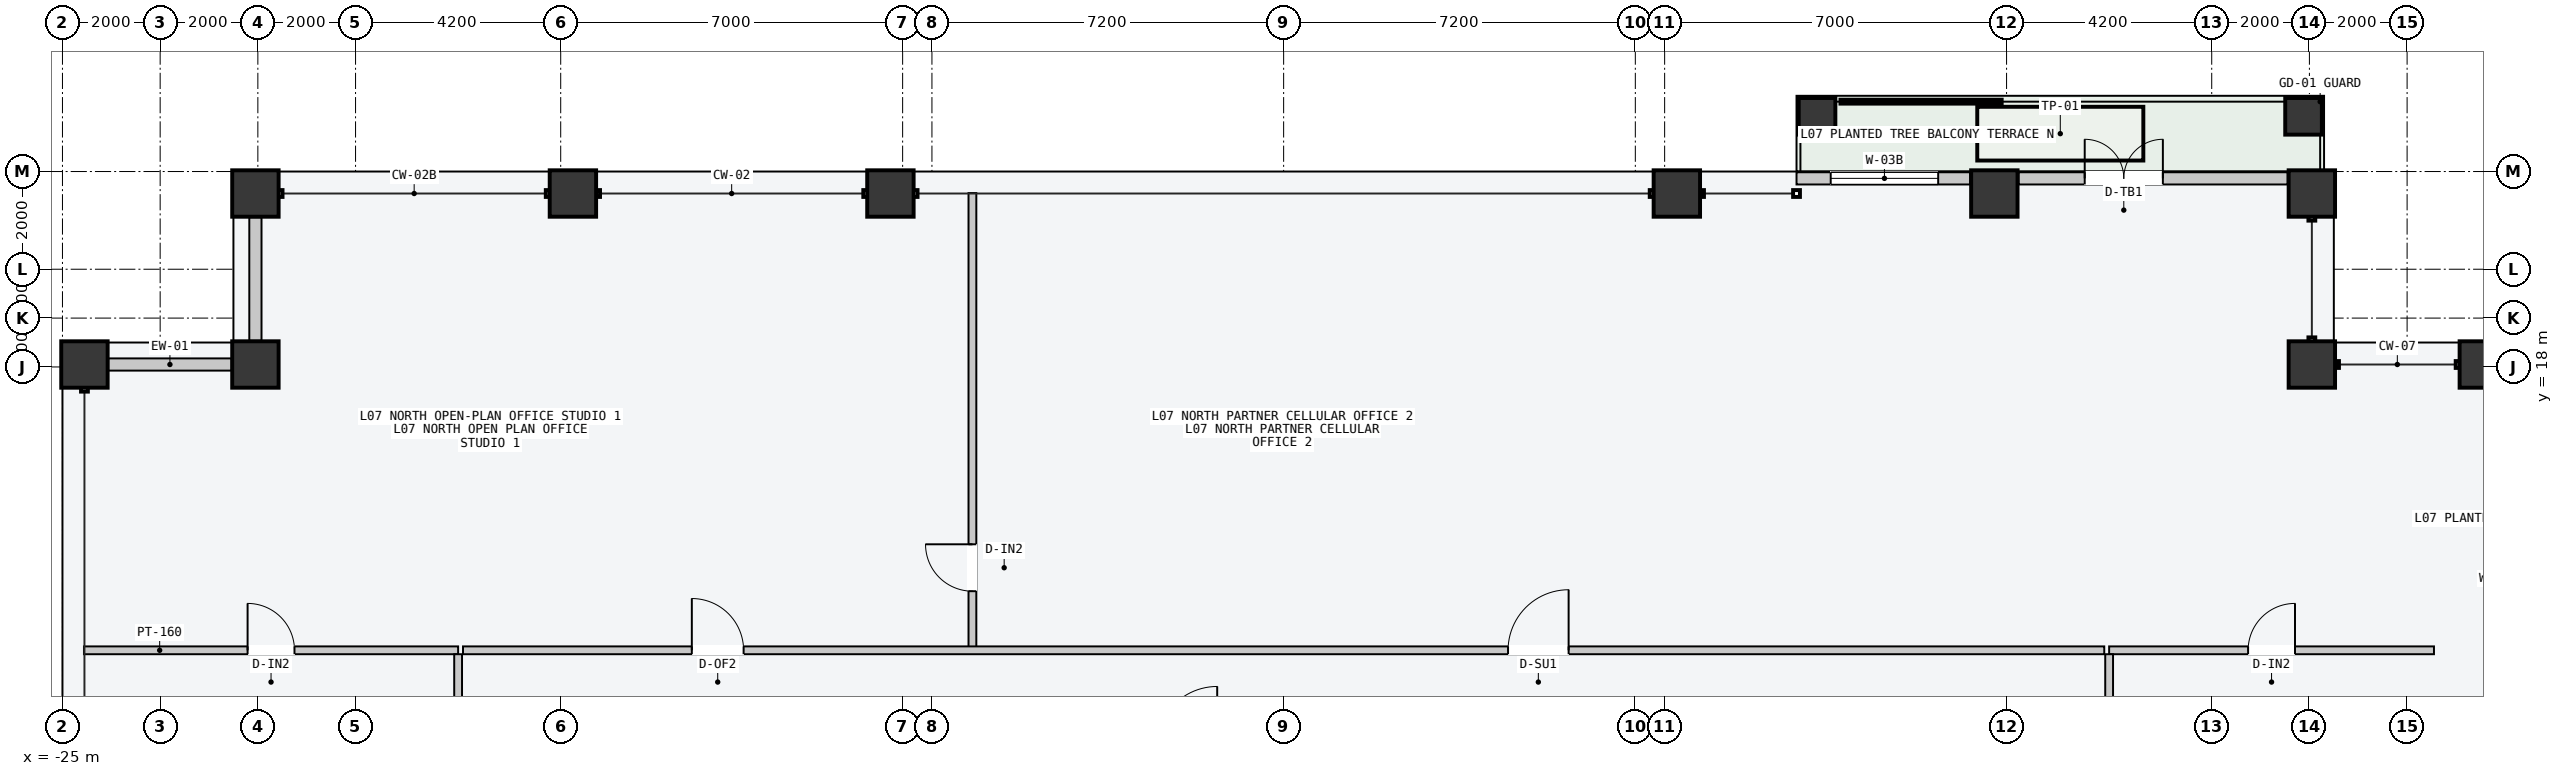
"""IFC4 building model, lengths in metres.
Left out: names, types, materials, properties, quantities, classifications, styles, units other than length and angle.
Written with IfcOpenShell. Run it as: python <this file> out.ifc"""

import sys

from ifc_helpers import new_model, si_unit, direction, frame, frame_2d, origin, origin_2d, place, context, subcontext, project, spatial, rectangle, hollow_rectangle, extrude, element, fill, save


model = new_model("IFC4")
c1 = context("Model", 3, precision=1e-05, world=origin(), true_north=direction((0.0, 1.0)))
c2 = subcontext(c1, "Body", "Model", "MODEL_VIEW")
j1 = project(units=[si_unit("LENGTHUNIT", "METRE"), si_unit("PLANEANGLEUNIT", "RADIAN")], contexts=[c1])
p1 = place(None, origin())
s1 = spatial("IfcSite", under=j1, at=p1, CompositionType="ELEMENT")
p2 = place(p1, origin())
s2 = spatial("IfcBuilding", under=s1, at=p2, CompositionType="ELEMENT")
p3 = place(p2, frame((0.0, 0.0, 31.2)))
s3 = spatial("IfcBuildingStorey", under=s2, at=p3, CompositionType="ELEMENT", Elevation=31.2)
for number, where, z_axis, x_axis in (
    (1, (-21.05, 21.55, 0.0), (0.0, 0.0, 1.0), (1.0, 0.0, 0.0)),
    (2, (-14.55, 21.55, 0.0), (0.0, 0.0, 1.0), (1.0, 0.0, 0.0)),
    (3, (-8.05, 21.55, 0.0), (0.0, 0.0, 1.0), (1.0, 0.0, 0.0)),
    (4, (8.05, 21.55, 0.0), (0.0, 0.0, 1.0), (1.0, 0.0, 0.0)),
    (5, (14.55, 21.55, 0.0), (0.0, 0.0, 1.0), (1.0, 0.0, 0.0)),
    (6, (21.05, 21.55, 0.0), (0.0, 0.0, 1.0), (1.0, 0.0, 0.0)),
    (7, (-24.55, 18.05, 0.0), (0.0, 0.0, 1.0), (0.0, 1.0, 0.0)),
    (8, (24.55, 18.05, 0.0), (0.0, 0.0, 1.0), (0.0, 1.0, 0.0)),
    (9, (-21.05, 18.05, 0.0), (0.0, 0.0, 1.0), (1.0, 0.0, 0.0)),
    (10, (21.05, 18.05, 0.0), (0.0, 0.0, 1.0), (1.0, 0.0, 0.0)),
):
    element("IfcColumn", number, at=place(p3, frame(where, z_axis=z_axis, x_axis=x_axis)), inside=s3, PredefinedType="COLUMN", context=c2, shape_type="SweptSolid", body=[
        extrude(hollow_rectangle(XDim=0.95, YDim=0.95, WallThickness=0.048, at=origin_2d()), origin(), (0.0, 0.0, 1.0), 3.6),
    ])
for number, where, z_axis, x_axis in (
    (11, (10.92, 23.13, 0.0), (0.0, 0.0, 1.0), (1.0, 0.0, 0.0)),
    (12, (20.88, 23.13, 0.0), (0.0, 0.0, 1.0), (1.0, 0.0, 0.0)),
):
    element("IfcColumn", number, at=place(p3, frame(where, z_axis=z_axis, x_axis=x_axis)), inside=s3, PredefinedType="COLUMN", context=c2, shape_type="SweptSolid", body=[
        extrude(hollow_rectangle(XDim=0.75, YDim=0.75, WallThickness=0.032, at=origin_2d()), origin(), (0.0, 0.0, 1.0), 3.6),
    ])
p4 = place(p3, frame((10.5, 21.86, 0.0), z_axis=(0.0, 0.0, 1.0), x_axis=(1.0, 0.0, 0.0)))
e13 = element("IfcWall", 13, at=p4, inside=s3, PredefinedType="STANDARD", context=c2, shape_type="SweptSolid", body=[
    extrude(rectangle(XDim=3.555, YDim=0.25, at=frame_2d((1.777, 0.0))), origin(), (0.0, 0.0, 1.0), 3.4),
])
p5 = place(p4, frame((0.7, 0.0, 0.85)))
e14 = element("IfcOpeningElement", 14, at=p5, cuts=e13, PredefinedType="OPENING", context=c2, shape_type="SweptSolid", body=[
    extrude(rectangle(XDim=2.2, YDim=2.1, at=frame_2d((1.1, 1.05))), frame((0.0, 0.135, 0.0), z_axis=(0.0, -1.0, 0.0), x_axis=(1.0, 0.0, 0.0)), (0.0, 0.0, 1.0), 0.27),
])
p6 = place(p3, frame((15.045, 21.86, 0.0), z_axis=(0.0, 0.0, 1.0), x_axis=(1.0, 0.0, 0.0)))
e15 = element("IfcWall", 15, at=p6, inside=s3, PredefinedType="STANDARD", context=c2, shape_type="SweptSolid", body=[
    extrude(rectangle(XDim=5.51, YDim=0.25, at=frame_2d((2.755, 0.0))), origin(), (0.0, 0.0, 1.0), 3.4),
])
p7 = place(p6, frame((1.355, 0.0, 0.0)))
e16 = element("IfcOpeningElement", 16, at=p7, cuts=e15, PredefinedType="OPENING", context=c2, shape_type="SweptSolid", body=[
    extrude(rectangle(XDim=1.6, YDim=2.2, at=frame_2d((0.8, 1.1))), frame((0.0, 0.135, 0.0), z_axis=(0.0, -1.0, 0.0), x_axis=(1.0, 0.0, 0.0)), (0.0, 0.0, 1.0), 0.27),
])
for number, where, z_axis, x_axis in (
    (17, (-24.065, 18.05, 0.0), (0.0, 0.0, 1.0), (1.0, 0.0, 0.0)),
    (18, (-21.05, 18.535, 0.0), (0.0, 0.0, 1.0), (0.0, 1.0, 0.0)),
):
    element("IfcWall", number, at=place(p3, frame(where, z_axis=z_axis, x_axis=x_axis)), inside=s3, PredefinedType="STANDARD", context=c2, shape_type="SweptSolid", body=[
        extrude(rectangle(XDim=2.53, YDim=0.25, at=frame_2d((1.265, 0.0))), origin(), (0.0, 0.0, 1.0), 2.7),
    ])
p8 = place(p3, frame((-6.371, 12.26, 0.0), z_axis=(0.0, 0.0, 1.0), x_axis=(0.0, 1.0, 0.0)))
e19 = element("IfcWall", 19, at=p8, inside=s3, PredefinedType="PARTITIONING", context=c2, shape_type="SweptSolid", body=[
    extrude(rectangle(XDim=9.3, YDim=0.16, at=frame_2d((4.65, 0.0))), origin(), (0.0, 0.0, 1.0), 3.4),
])
p9 = place(p8, frame((1.15, 0.0, 0.0)))
e20 = element("IfcOpeningElement", 20, at=p9, cuts=e19, PredefinedType="OPENING", context=c2, shape_type="SweptSolid", body=[
    extrude(rectangle(XDim=0.96, YDim=2.18, at=frame_2d((0.48, 1.09))), frame((0.0, 0.09, 0.0), z_axis=(0.0, -1.0, 0.0), x_axis=(1.0, 0.0, 0.0)), (0.0, 0.0, 1.0), 0.18),
])
p10 = place(p3, frame((-16.8, 12.2, 0.0), z_axis=(0.0, 0.0, 1.0), x_axis=(1.0, 0.0, 0.0)))
e21 = element("IfcWall", 21, at=p10, inside=s3, PredefinedType="PARTITIONING", context=c2, shape_type="SweptSolid", body=[
    extrude(rectangle(XDim=33.6, YDim=0.16, at=frame_2d((16.8, 0.0))), origin(), (0.0, 0.0, 1.0), 3.4),
])
p11 = place(p10, frame((4.684, 0.0, 0.0)))
e22 = element("IfcOpeningElement", 22, at=p11, cuts=e21, PredefinedType="OPENING", context=c2, shape_type="SweptSolid", body=[
    extrude(rectangle(XDim=1.06, YDim=2.2, at=frame_2d((0.53, 1.1))), frame((0.0, 0.09, 0.0), z_axis=(0.0, -1.0, 0.0), x_axis=(1.0, 0.0, 0.0)), (0.0, 0.0, 1.0), 0.18),
])
p12 = place(p10, frame((21.394, 0.0, 0.0)))
e23 = element("IfcOpeningElement", 23, at=p12, cuts=e21, PredefinedType="OPENING", context=c2, shape_type="SweptSolid", body=[
    extrude(rectangle(XDim=1.24, YDim=2.24, at=frame_2d((0.62, 1.12))), frame((0.0, 0.09, 0.0), z_axis=(0.0, -1.0, 0.0), x_axis=(1.0, 0.0, 0.0)), (0.0, 0.0, 1.0), 0.18),
])
p13 = place(p3, frame((-24.56, 12.2, 0.0), z_axis=(0.0, 0.0, 1.0), x_axis=(1.0, 0.0, 0.0)))
e24 = element("IfcWall", 24, at=p13, inside=s3, PredefinedType="PARTITIONING", context=c2, shape_type="SweptSolid", body=[
    extrude(rectangle(XDim=7.66, YDim=0.16, at=frame_2d((3.83, 0.0))), origin(), (0.0, 0.0, 1.0), 3.4),
])
p14 = place(p13, frame((3.35, 0.0, 0.0)))
e25 = element("IfcOpeningElement", 25, at=p14, cuts=e24, PredefinedType="OPENING", context=c2, shape_type="SweptSolid", body=[
    extrude(rectangle(XDim=0.96, YDim=2.18, at=frame_2d((0.48, 1.09))), frame((0.0, 0.09, 0.0), z_axis=(0.0, -1.0, 0.0), x_axis=(1.0, 0.0, 0.0)), (0.0, 0.0, 1.0), 0.18),
])
p15 = place(p3, frame((16.9, 12.2, 0.0), z_axis=(0.0, 0.0, 1.0), x_axis=(1.0, 0.0, 0.0)))
e26 = element("IfcWall", 26, at=p15, inside=s3, PredefinedType="PARTITIONING", context=c2, shape_type="SweptSolid", body=[
    extrude(rectangle(XDim=6.65, YDim=0.16, at=frame_2d((3.325, 0.0))), origin(), (0.0, 0.0, 1.0), 3.4),
])
p16 = place(p15, frame((2.845, 0.0, 0.0)))
e27 = element("IfcOpeningElement", 27, at=p16, cuts=e26, PredefinedType="OPENING", context=c2, shape_type="SweptSolid", body=[
    extrude(rectangle(XDim=0.96, YDim=2.18, at=frame_2d((0.48, 1.09))), frame((0.0, 0.09, 0.0), z_axis=(0.0, -1.0, 0.0), x_axis=(1.0, 0.0, 0.0)), (0.0, 0.0, 1.0), 0.18),
])
p17 = place(p3, frame((-16.9, -12.12, 0.0), z_axis=(0.0, 0.0, 1.0), x_axis=(0.0, 1.0, 0.0)))
e28 = element("IfcWall", 28, at=p17, inside=s3, PredefinedType="PARTITIONING", context=c2, shape_type="SweptSolid", body=[
    extrude(rectangle(XDim=24.24, YDim=0.16, at=frame_2d((12.12, 0.0))), origin(), (0.0, 0.0, 1.0), 3.4),
])
p18 = place(p17, frame((11.5, 0.0, 0.0)))
e29 = element("IfcOpeningElement", 29, at=p18, cuts=e28, PredefinedType="OPENING", context=c2, shape_type="SweptSolid", body=[
    extrude(rectangle(XDim=1.24, YDim=2.24, at=frame_2d((0.62, 1.12))), frame((0.0, 0.09, 0.0), z_axis=(0.0, -1.0, 0.0), x_axis=(1.0, 0.0, 0.0)), (0.0, 0.0, 1.0), 0.18),
])
p19 = place(p3, frame((16.9, -12.12, 0.0), z_axis=(0.0, 0.0, 1.0), x_axis=(0.0, 1.0, 0.0)))
e30 = element("IfcWall", 30, at=p19, inside=s3, PredefinedType="PARTITIONING", context=c2, shape_type="SweptSolid", body=[
    extrude(rectangle(XDim=24.24, YDim=0.16, at=frame_2d((12.12, 0.0))), origin(), (0.0, 0.0, 1.0), 3.4),
])
p20 = place(p19, frame((3.501, 0.0, 0.0)))
e31 = element("IfcOpeningElement", 31, at=p20, cuts=e30, PredefinedType="OPENING", context=c2, shape_type="SweptSolid", body=[
    extrude(rectangle(XDim=1.24, YDim=2.24, at=frame_2d((0.62, 1.12))), frame((0.0, 0.09, 0.0), z_axis=(0.0, -1.0, 0.0), x_axis=(1.0, 0.0, 0.0)), (0.0, 0.0, 1.0), 0.18),
])
p21 = place(p19, frame((15.541, 0.0, 0.0)))
e32 = element("IfcOpeningElement", 32, at=p21, cuts=e30, PredefinedType="OPENING", context=c2, shape_type="SweptSolid", body=[
    extrude(rectangle(XDim=1.4, YDim=2.2, at=frame_2d((0.7, 1.1))), frame((0.0, 0.09, 0.0), z_axis=(0.0, -1.0, 0.0), x_axis=(1.0, 0.0, 0.0)), (0.0, 0.0, 1.0), 0.18),
])
p22 = place(p5, origin())
e33 = element("IfcWindow", 33, at=p22, inside=s3, PartitioningType="SINGLE_PANEL", PredefinedType="WINDOW", context=c2, shape_type="SweptSolid", body=[
    extrude(rectangle(XDim=2.2, YDim=2.1, at=frame_2d((1.1, 1.05))), frame((0.0, 0.03, 0.0), z_axis=(0.0, -1.0, 0.0), x_axis=(1.0, 0.0, 0.0)), (0.0, 0.0, 1.0), 0.06),
])
fill(e14, e33)
p23 = place(p7, origin())
e34 = element("IfcDoor", 34, at=p23, inside=s3, OperationType="DOUBLE_DOOR_SINGLE_SWING", PredefinedType="DOOR", context=c2, shape_type="SweptSolid", body=[
    extrude(rectangle(XDim=1.6, YDim=2.2, at=frame_2d((0.8, 1.1))), frame((0.0, 0.025, 0.0), z_axis=(0.0, -1.0, 0.0), x_axis=(1.0, 0.0, 0.0)), (0.0, 0.0, 1.0), 0.05),
])
fill(e16, e34)
p24 = place(p9, origin())
e35 = element("IfcDoor", 35, at=p24, inside=s3, OperationType="SINGLE_SWING_RIGHT", PredefinedType="DOOR", context=c2, shape_type="SweptSolid", body=[
    extrude(rectangle(XDim=0.96, YDim=2.18, at=frame_2d((0.48, 1.09))), frame((0.0, 0.025, 0.0), z_axis=(0.0, -1.0, 0.0), x_axis=(1.0, 0.0, 0.0)), (0.0, 0.0, 1.0), 0.05),
])
fill(e20, e35)
p25 = place(p11, origin())
e36 = element("IfcDoor", 36, at=p25, inside=s3, OperationType="SINGLE_SWING_LEFT", PredefinedType="DOOR", context=c2, shape_type="SweptSolid", body=[
    extrude(rectangle(XDim=1.06, YDim=2.2, at=frame_2d((0.53, 1.1))), frame((0.0, 0.025, 0.0), z_axis=(0.0, -1.0, 0.0), x_axis=(1.0, 0.0, 0.0)), (0.0, 0.0, 1.0), 0.05),
])
fill(e22, e36)
p26 = place(p12, origin())
e37 = element("IfcDoor", 37, at=p26, inside=s3, OperationType="SINGLE_SWING_RIGHT", PredefinedType="DOOR", context=c2, shape_type="SweptSolid", body=[
    extrude(rectangle(XDim=1.24, YDim=2.24, at=frame_2d((0.62, 1.12))), frame((0.0, 0.025, 0.0), z_axis=(0.0, -1.0, 0.0), x_axis=(1.0, 0.0, 0.0)), (0.0, 0.0, 1.0), 0.05),
])
fill(e23, e37)
p27 = place(p14, origin())
e38 = element("IfcDoor", 38, at=p27, inside=s3, OperationType="SINGLE_SWING_LEFT", PredefinedType="DOOR", context=c2, shape_type="SweptSolid", body=[
    extrude(rectangle(XDim=0.96, YDim=2.18, at=frame_2d((0.48, 1.09))), frame((0.0, 0.025, 0.0), z_axis=(0.0, -1.0, 0.0), x_axis=(1.0, 0.0, 0.0)), (0.0, 0.0, 1.0), 0.05),
])
fill(e25, e38)
p28 = place(p16, origin())
e39 = element("IfcDoor", 39, at=p28, inside=s3, OperationType="SINGLE_SWING_RIGHT", PredefinedType="DOOR", context=c2, shape_type="SweptSolid", body=[
    extrude(rectangle(XDim=0.96, YDim=2.18, at=frame_2d((0.48, 1.09))), frame((0.0, 0.025, 0.0), z_axis=(0.0, -1.0, 0.0), x_axis=(1.0, 0.0, 0.0)), (0.0, 0.0, 1.0), 0.05),
])
fill(e27, e39)
save(model, sys.argv[1])
